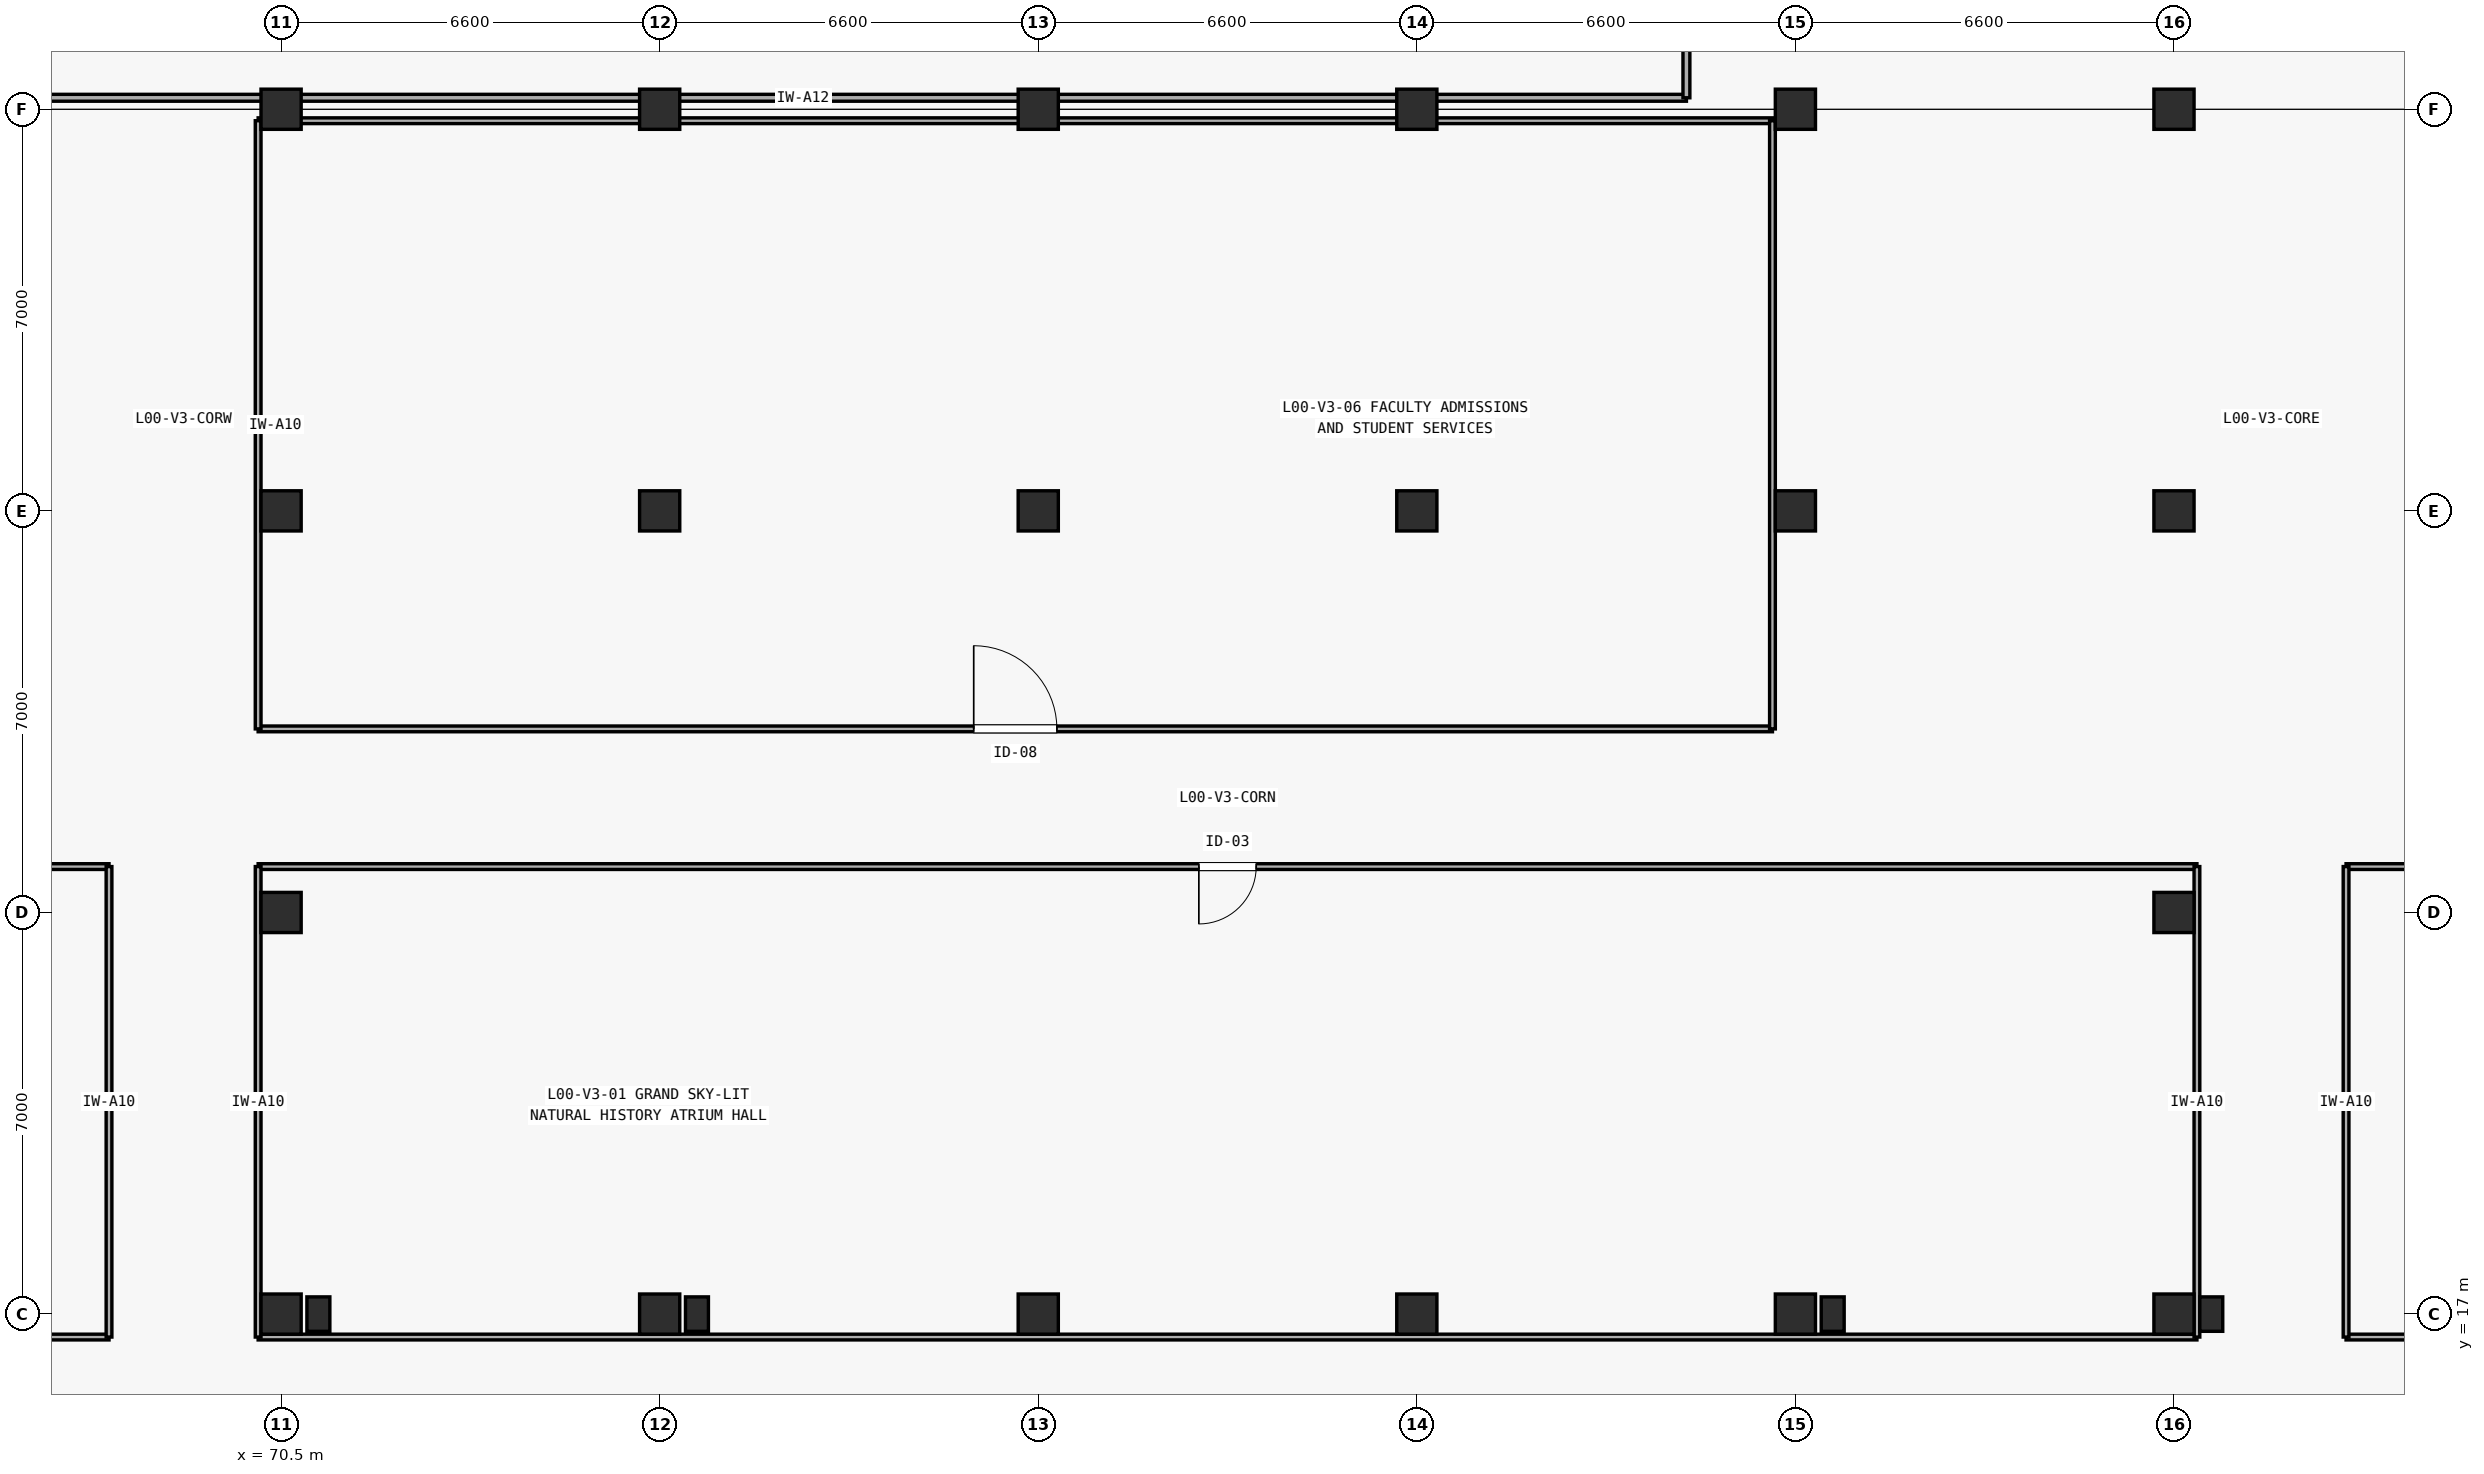
"""IFC4 building model, lengths in metres.
Left out: names, types, materials, properties, quantities, classifications, styles, units other than length and angle.
Written with IfcOpenShell. Run it as: python <this file> out.ifc"""

import sys

from ifc_helpers import new_model, si_unit, direction, frame, frame_2d, origin, origin_2d, place, context, subcontext, project, spatial, rectangle, extrude, element, fill, save


model = new_model("IFC4")
c1 = context("Model", 3, precision=1e-05, world=origin(), true_north=direction((0.0, 1.0)))
c2 = subcontext(c1, "Body", "Model", "MODEL_VIEW")
j1 = project(units=[si_unit("LENGTHUNIT", "METRE"), si_unit("PLANEANGLEUNIT", "RADIAN")], contexts=[c1])
p1 = place(None, origin())
s1 = spatial("IfcSite", under=j1, at=p1, CompositionType="ELEMENT")
p2 = place(p1, origin())
s2 = spatial("IfcBuilding", under=s1, at=p2, CompositionType="ELEMENT")
p3 = place(p2, origin())
s3 = spatial("IfcBuildingStorey", under=s2, at=p3, CompositionType="ELEMENT", Elevation=0.0)
for number, where, z_axis, x_axis in (
    (1, (70.5, 17.0, 0.0), (0.0, 0.0, 1.0), (1.0, 0.0, 0.0)),
    (2, (70.5, 24.0, 0.0), (0.0, 0.0, 1.0), (1.0, 0.0, 0.0)),
    (3, (70.5, 31.0, 0.0), (0.0, 0.0, 1.0), (1.0, 0.0, 0.0)),
    (4, (70.5, 38.0, 0.0), (0.0, 0.0, 1.0), (1.0, 0.0, 0.0)),
    (5, (77.1, 17.0, 0.0), (0.0, 0.0, 1.0), (1.0, 0.0, 0.0)),
    (6, (77.1, 31.0, 0.0), (0.0, 0.0, 1.0), (1.0, 0.0, 0.0)),
    (7, (77.1, 38.0, 0.0), (0.0, 0.0, 1.0), (1.0, 0.0, 0.0)),
    (8, (83.7, 17.0, 0.0), (0.0, 0.0, 1.0), (1.0, 0.0, 0.0)),
    (9, (83.7, 31.0, 0.0), (0.0, 0.0, 1.0), (1.0, 0.0, 0.0)),
    (10, (83.7, 38.0, 0.0), (0.0, 0.0, 1.0), (1.0, 0.0, 0.0)),
    (11, (90.3, 17.0, 0.0), (0.0, 0.0, 1.0), (1.0, 0.0, 0.0)),
    (12, (90.3, 31.0, 0.0), (0.0, 0.0, 1.0), (1.0, 0.0, 0.0)),
    (13, (90.3, 38.0, 0.0), (0.0, 0.0, 1.0), (1.0, 0.0, 0.0)),
    (14, (96.9, 17.0, 0.0), (0.0, 0.0, 1.0), (1.0, 0.0, 0.0)),
    (15, (96.9, 31.0, 0.0), (0.0, 0.0, 1.0), (1.0, 0.0, 0.0)),
    (16, (96.9, 38.0, 0.0), (0.0, 0.0, 1.0), (1.0, 0.0, 0.0)),
    (17, (103.5, 17.0, 0.0), (0.0, 0.0, 1.0), (1.0, 0.0, 0.0)),
    (18, (103.5, 24.0, 0.0), (0.0, 0.0, 1.0), (1.0, 0.0, 0.0)),
    (19, (103.5, 31.0, 0.0), (0.0, 0.0, 1.0), (1.0, 0.0, 0.0)),
    (20, (103.5, 38.0, 0.0), (0.0, 0.0, 1.0), (1.0, 0.0, 0.0)),
):
    element("IfcColumn", number, at=place(p3, frame(where, z_axis=z_axis, x_axis=x_axis)), inside=s3, PredefinedType="COLUMN", context=c2, shape_type="SweptSolid", body=[
        extrude(rectangle(XDim=0.7, YDim=0.7, at=origin_2d()), origin(), (0.0, 0.0, 1.0), 4.2),
    ])
for number, where, z_axis, x_axis in (
    (21, (71.15, 17.0, 0.0), (0.0, 0.0, 1.0), (1.0, 0.0, 0.0)),
    (22, (77.75, 17.0, 0.0), (0.0, 0.0, 1.0), (1.0, 0.0, 0.0)),
    (23, (97.55, 17.0, 0.0), (0.0, 0.0, 1.0), (1.0, 0.0, 0.0)),
    (24, (104.15, 17.0, 0.0), (0.0, 0.0, 1.0), (1.0, 0.0, 0.0)),
):
    element("IfcColumn", number, at=place(p3, frame(where, z_axis=z_axis, x_axis=x_axis)), inside=s3, PredefinedType="PILASTER", context=c2, shape_type="SweptSolid", body=[
        extrude(rectangle(XDim=0.4, YDim=0.6, at=origin_2d()), origin(), (0.0, 0.0, 1.0), 4.2),
    ])
p4 = place(p3, frame((70.1, 16.6, 0.0), z_axis=(0.0, 0.0, 1.0), x_axis=(1.0, 0.0, 0.0)))
e25 = element("IfcWall", 25, at=p4, inside=s3, PredefinedType="PARTITIONING", context=c2, shape_type="SweptSolid", body=[
    extrude(rectangle(XDim=33.8, YDim=0.1, at=frame_2d((16.9, 0.0))), origin(), (0.0, 0.0, 1.0), 3.135),
])
p5 = place(p3, frame((70.1, 24.8, 0.0), z_axis=(0.0, 0.0, 1.0), x_axis=(1.0, 0.0, 0.0)))
e26 = element("IfcWall", 26, at=p5, inside=s3, PredefinedType="PARTITIONING", context=c2, shape_type="SweptSolid", body=[
    extrude(rectangle(XDim=33.8, YDim=0.1, at=frame_2d((16.9, 0.0))), origin(), (0.0, 0.0, 1.0), 3.9),
])
p6 = place(p5, frame((16.4, 0.0, 0.0)))
e27 = element("IfcOpeningElement", 27, at=p6, cuts=e26, PredefinedType="OPENING", context=c2, shape_type="SweptSolid", body=[
    extrude(rectangle(XDim=1.0, YDim=2.1, at=frame_2d((0.5, 1.05))), frame((0.0, 0.06, 0.0), z_axis=(0.0, -1.0, 0.0), x_axis=(1.0, 0.0, 0.0)), (0.0, 0.0, 1.0), 0.12),
])
for number, where, z_axis, x_axis in (
    (28, (70.1, 16.6, 0.0), (0.0, 0.0, 1.0), (0.0, 1.0, 0.0)),
    (29, (103.9, 16.6, 0.0), (0.0, 0.0, 1.0), (0.0, 1.0, 0.0)),
):
    element("IfcWall", number, at=place(p3, frame(where, z_axis=z_axis, x_axis=x_axis)), inside=s3, PredefinedType="PARTITIONING", context=c2, shape_type="SweptSolid", body=[
        extrude(rectangle(XDim=8.2, YDim=0.1, at=frame_2d((4.1, 0.0))), origin(), (0.0, 0.0, 1.0), 3.9),
    ])
p7 = place(p3, frame((50.9, 16.6, 0.0), z_axis=(0.0, 0.0, 1.0), x_axis=(1.0, 0.0, 0.0)))
e30 = element("IfcWall", 30, at=p7, inside=s3, PredefinedType="PARTITIONING", context=c2, shape_type="SweptSolid", body=[
    extrude(rectangle(XDim=16.6, YDim=0.1, at=frame_2d((8.3, 0.0))), origin(), (0.0, 0.0, 1.0), 3.9),
])
p8 = place(p3, frame((50.9, 24.8, 0.0), z_axis=(0.0, 0.0, 1.0), x_axis=(1.0, 0.0, 0.0)))
e31 = element("IfcWall", 31, at=p8, inside=s3, PredefinedType="PARTITIONING", context=c2, shape_type="SweptSolid", body=[
    extrude(rectangle(XDim=16.6, YDim=0.1, at=frame_2d((8.3, 0.0))), origin(), (0.0, 0.0, 1.0), 3.9),
])
p9 = place(p8, frame((7.875, 0.0, 0.0)))
e32 = element("IfcOpeningElement", 32, at=p9, cuts=e31, PredefinedType="OPENING", context=c2, shape_type="SweptSolid", body=[
    extrude(rectangle(XDim=1.25, YDim=2.15, at=frame_2d((0.625, 1.075))), frame((0.0, 0.06, 0.0), z_axis=(0.0, -1.0, 0.0), x_axis=(1.0, 0.0, 0.0)), (0.0, 0.0, 1.0), 0.12),
])
p10 = place(p3, frame((67.5, 16.6, 0.0), z_axis=(0.0, 0.0, 1.0), x_axis=(0.0, 1.0, 0.0)))
e33 = element("IfcWall", 33, at=p10, inside=s3, PredefinedType="PARTITIONING", context=c2, shape_type="SweptSolid", body=[
    extrude(rectangle(XDim=8.2, YDim=0.1, at=frame_2d((4.1, 0.0))), origin(), (0.0, 0.0, 1.0), 3.9),
])
p11 = place(p3, frame((106.5, 16.6, 0.0), z_axis=(0.0, 0.0, 1.0), x_axis=(1.0, 0.0, 0.0)))
e34 = element("IfcWall", 34, at=p11, inside=s3, PredefinedType="PARTITIONING", context=c2, shape_type="SweptSolid", body=[
    extrude(rectangle(XDim=16.6, YDim=0.1, at=frame_2d((8.3, 0.0))), origin(), (0.0, 0.0, 1.0), 3.9),
])
p12 = place(p3, frame((106.5, 24.8, 0.0), z_axis=(0.0, 0.0, 1.0), x_axis=(1.0, 0.0, 0.0)))
e35 = element("IfcWall", 35, at=p12, inside=s3, PredefinedType="PARTITIONING", context=c2, shape_type="SweptSolid", body=[
    extrude(rectangle(XDim=16.6, YDim=0.1, at=frame_2d((8.3, 0.0))), origin(), (0.0, 0.0, 1.0), 3.9),
])
p13 = place(p12, frame((7.425, 0.0, 0.0)))
e36 = element("IfcOpeningElement", 36, at=p13, cuts=e35, PredefinedType="OPENING", context=c2, shape_type="SweptSolid", body=[
    extrude(rectangle(XDim=1.35, YDim=2.2, at=frame_2d((0.675, 1.1))), frame((0.0, 0.06, 0.0), z_axis=(0.0, -1.0, 0.0), x_axis=(1.0, 0.0, 0.0)), (0.0, 0.0, 1.0), 0.12),
])
p14 = place(p3, frame((106.5, 16.6, 0.0), z_axis=(0.0, 0.0, 1.0), x_axis=(0.0, 1.0, 0.0)))
e37 = element("IfcWall", 37, at=p14, inside=s3, PredefinedType="PARTITIONING", context=c2, shape_type="SweptSolid", body=[
    extrude(rectangle(XDim=8.2, YDim=0.1, at=frame_2d((4.1, 0.0))), origin(), (0.0, 0.0, 1.0), 3.9),
])
p15 = place(p3, frame((70.1, 27.2, 0.0), z_axis=(0.0, 0.0, 1.0), x_axis=(1.0, 0.0, 0.0)))
e38 = element("IfcWall", 38, at=p15, inside=s3, PredefinedType="PARTITIONING", context=c2, shape_type="SweptSolid", body=[
    extrude(rectangle(XDim=26.4, YDim=0.1, at=frame_2d((13.2, 0.0))), origin(), (0.0, 0.0, 1.0), 3.9),
])
p16 = place(p15, frame((12.475, 0.0, 0.0)))
e39 = element("IfcOpeningElement", 39, at=p16, cuts=e38, PredefinedType="OPENING", context=c2, shape_type="SweptSolid", body=[
    extrude(rectangle(XDim=1.45, YDim=2.2, at=frame_2d((0.725, 1.1))), frame((0.0, 0.06, 0.0), z_axis=(0.0, -1.0, 0.0), x_axis=(1.0, 0.0, 0.0)), (0.0, 0.0, 1.0), 0.12),
])
p17 = place(p3, frame((70.1, 37.8, 0.0), z_axis=(0.0, 0.0, 1.0), x_axis=(1.0, 0.0, 0.0)))
e40 = element("IfcWall", 40, at=p17, inside=s3, PredefinedType="PARTITIONING", context=c2, shape_type="SweptSolid", body=[
    extrude(rectangle(XDim=26.4, YDim=0.1, at=frame_2d((13.2, 0.0))), origin(), (0.0, 0.0, 1.0), 3.135),
])
for number, where, z_axis, x_axis in (
    (41, (70.1, 27.2, 0.0), (0.0, 0.0, 1.0), (0.0, 1.0, 0.0)),
    (42, (96.5, 27.2, 0.0), (0.0, 0.0, 1.0), (0.0, 1.0, 0.0)),
):
    element("IfcWall", number, at=place(p3, frame(where, z_axis=z_axis, x_axis=x_axis)), inside=s3, PredefinedType="PARTITIONING", context=c2, shape_type="SweptSolid", body=[
        extrude(rectangle(XDim=10.6, YDim=0.1, at=frame_2d((5.3, 0.0))), origin(), (0.0, 0.0, 1.0), 3.9),
    ])
p18 = place(p3, frame((64.2, 38.2, 0.0), z_axis=(0.0, 0.0, 1.0), x_axis=(1.0, 0.0, 0.0)))
e43 = element("IfcWall", 43, at=p18, inside=s3, PredefinedType="PARTITIONING", context=c2, shape_type="SweptSolid", body=[
    extrude(rectangle(XDim=30.8, YDim=0.12, at=frame_2d((15.4, 0.0))), origin(), (0.0, 0.0, 1.0), 3.135),
])
p19 = place(p3, frame((95.0, 38.2, 0.0), z_axis=(0.0, 0.0, 1.0), x_axis=(0.0, 1.0, 0.0)))
e44 = element("IfcWall", 44, at=p19, inside=s3, PredefinedType="PARTITIONING", context=c2, shape_type="SweptSolid", body=[
    extrude(rectangle(XDim=11.1, YDim=0.12, at=frame_2d((5.55, 0.0))), origin(), (0.0, 0.0, 1.0), 3.9),
])
p20 = place(p6, frame((1.0, 0.0, 0.0), z_axis=(0.0, 0.0, 1.0), x_axis=(-1.0, 0.0, 0.0)))
e45 = element("IfcDoor", 45, at=p20, inside=s3, OperationType="SINGLE_SWING_RIGHT", PredefinedType="DOOR", context=c2, shape_type="SweptSolid", body=[
    extrude(rectangle(XDim=1.0, YDim=2.1, at=frame_2d((0.5, 1.05))), frame((0.0, 0.025, 0.0), z_axis=(0.0, -1.0, 0.0), x_axis=(1.0, 0.0, 0.0)), (0.0, 0.0, 1.0), 0.05),
])
fill(e27, e45)
p21 = place(p16, origin())
e46 = element("IfcDoor", 46, at=p21, inside=s3, OperationType="SINGLE_SWING_LEFT", PredefinedType="DOOR", context=c2, shape_type="SweptSolid", body=[
    extrude(rectangle(XDim=1.45, YDim=2.2, at=frame_2d((0.725, 1.1))), frame((0.0, 0.025, 0.0), z_axis=(0.0, -1.0, 0.0), x_axis=(1.0, 0.0, 0.0)), (0.0, 0.0, 1.0), 0.05),
])
fill(e39, e46)
save(model, sys.argv[1])
